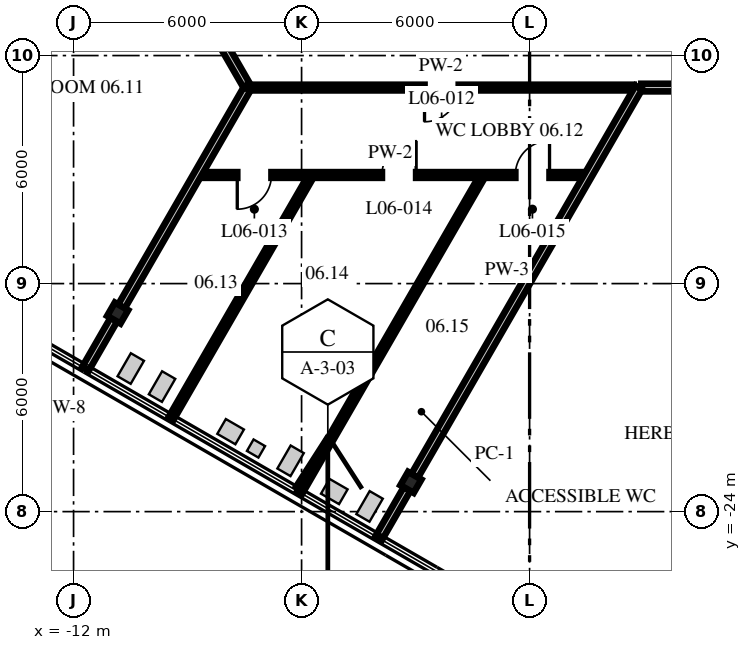
"""IFC4 building model, lengths in metres.
Left out: names, types, materials, properties, quantities, classifications, styles, units other than length and angle.
Written with IfcOpenShell. Run it as: python <this file> out.ifc"""

import sys

from ifc_helpers import new_model, si_unit, direction, frame, frame_2d, origin, origin_2d, place, context, subcontext, project, spatial, rectangle, i_section, extrude, source, transform, mapped, element, fill, save


model = new_model("IFC4")
c1 = context("Model", 3, precision=1e-05, world=origin(), true_north=direction((0.0, 1.0)))
c2 = subcontext(c1, "Body", "Model", "MODEL_VIEW")
j1 = project(units=[si_unit("LENGTHUNIT", "METRE"), si_unit("PLANEANGLEUNIT", "RADIAN")], contexts=[c1])
p1 = place(None, origin())
s1 = spatial("IfcSite", under=j1, at=p1, CompositionType="ELEMENT")
p2 = place(p1, origin())
s2 = spatial("IfcBuilding", under=s1, at=p2, CompositionType="ELEMENT")
p3 = place(p2, frame((0.0, 0.0, 28.9)))
s3 = spatial("IfcBuildingStorey", under=s2, at=p3, CompositionType="ELEMENT", Elevation=28.9)
m1 = source(origin(), c2, "Body", "SweptSolid", [
    extrude(i_section(OverallWidth=0.404, OverallDepth=0.406, WebThickness=0.027, FlangeThickness=0.044, at=origin_2d()), origin(), (0.0, 0.0, 1.0), 4.3),
])
for number, where, z_axis, x_axis in (
    (1, (-10.84, -18.775, 0.0), (0.0, 0.0, 1.0), (0.866, -0.5, 0.0)),
    (2, (-3.124, -23.23, 0.0), (0.0, 0.0, 1.0), (0.866, -0.5, 0.0)),
):
    element("IfcColumn", number, at=place(p3, frame(where, z_axis=z_axis, x_axis=x_axis)), inside=s3, PredefinedType="COLUMN", context=c2, shape_type="MappedRepresentation", body=[
        mapped(m1, transform((0.0, 0.0, 0.0), scale=1.0)),
    ])
m2 = source(origin(), c2, "Body", "SweptSolid", [
    extrude(rectangle(XDim=8.478, YDim=0.2, at=frame_2d((4.239, 0.0))), origin(), (0.0, 0.0, 1.0), 4.1),
])
p4 = place(p3, frame((-11.673, -5.466, 0.0), z_axis=(0.0, 0.0, 1.0), x_axis=(0.499985860718, -0.866033566949, 0.0)))
e3 = element("IfcWall", 3, at=p4, inside=s3, PredefinedType="PARTITIONING", context=c2, shape_type="MappedRepresentation", body=[
    mapped(m2, transform((0.0, 0.0, 0.0), scale=1.0)),
])
m3 = source(origin(), c2, "Body", "SweptSolid", [
    extrude(rectangle(XDim=10.148, YDim=0.15, at=frame_2d((5.074, 0.0))), origin(), (0.0, 0.0, 1.0), 4.1),
])
p5 = place(p3, frame((-8.742, -15.142, 0.0), z_axis=(0.0, 0.0, 1.0), x_axis=(1.0, 0.0, 0.0)))
e4 = element("IfcWall", 4, at=p5, inside=s3, PredefinedType="PARTITIONING", context=c2, shape_type="MappedRepresentation", body=[
    mapped(m3, transform((0.0, 0.0, 0.0), scale=1.0)),
])
p6 = place(p5, frame((1.05, 0.0, 0.0)))
e5 = element("IfcOpeningElement", 5, at=p6, cuts=e4, PredefinedType="OPENING", context=c2, shape_type="SweptSolid", body=[
    extrude(rectangle(XDim=0.9, YDim=2.1, at=frame_2d((0.45, 1.05))), frame((0.0, 0.085, 0.0), z_axis=(0.0, -1.0, 0.0), x_axis=(1.0, 0.0, 0.0)), (0.0, 0.0, 1.0), 0.17),
])
p7 = place(p5, frame((4.857, 0.0, 0.0)))
e6 = element("IfcOpeningElement", 6, at=p7, cuts=e4, PredefinedType="OPENING", context=c2, shape_type="SweptSolid", body=[
    extrude(rectangle(XDim=0.9, YDim=2.1, at=frame_2d((0.45, 1.05))), frame((0.0, 0.085, 0.0), z_axis=(0.0, -1.0, 0.0), x_axis=(1.0, 0.0, 0.0)), (0.0, 0.0, 1.0), 0.17),
])
p8 = place(p5, frame((8.367, 0.0, 0.0)))
e7 = element("IfcOpeningElement", 7, at=p8, cuts=e4, PredefinedType="OPENING", context=c2, shape_type="SweptSolid", body=[
    extrude(rectangle(XDim=0.9, YDim=2.1, at=frame_2d((0.45, 1.05))), frame((0.0, 0.085, 0.0), z_axis=(0.0, -1.0, 0.0), x_axis=(1.0, 0.0, 0.0)), (0.0, 0.0, 1.0), 0.17),
])
m4 = source(origin(), c2, "Body", "SweptSolid", [
    extrude(rectangle(XDim=10.155, YDim=0.15, at=frame_2d((5.078, 0.0))), origin(), (0.0, 0.0, 1.0), 4.1),
])
p9 = place(p3, frame((-7.415, -12.842, 0.0), z_axis=(0.0, 0.0, 1.0), x_axis=(1.0, 0.0, 0.0)))
e8 = element("IfcWall", 8, at=p9, inside=s3, PredefinedType="PARTITIONING", context=c2, shape_type="MappedRepresentation", body=[
    mapped(m4, transform((0.0, 0.0, 0.0), scale=1.0)),
])
p10 = place(p9, frame((4.65, 0.0, 0.0)))
e9 = element("IfcOpeningElement", 9, at=p10, cuts=e8, PredefinedType="OPENING", context=c2, shape_type="SweptSolid", body=[
    extrude(rectangle(XDim=0.9, YDim=2.1, at=frame_2d((0.45, 1.05))), frame((0.0, 0.085, 0.0), z_axis=(0.0, -1.0, 0.0), x_axis=(1.0, 0.0, 0.0)), (0.0, 0.0, 1.0), 0.17),
])
m5 = source(origin(), c2, "Body", "SweptSolid", [
    extrude(rectangle(XDim=4.404, YDim=0.2, at=frame_2d((2.202, 0.0))), origin(), (0.0, 0.0, 1.0), 4.1),
])
p11 = place(p3, frame((2.94, -12.842, 0.0), z_axis=(0.0, 0.0, 1.0), x_axis=(1.0, 0.0, 0.0)))
e10 = element("IfcWall", 10, at=p11, inside=s3, PredefinedType="PARTITIONING", context=c2, shape_type="MappedRepresentation", body=[
    mapped(m5, transform((0.0, 0.0, 0.0), scale=1.0)),
])
p12 = place(p11, frame((1.683, 0.0, 0.0)))
e11 = element("IfcOpeningElement", 11, at=p12, cuts=e10, PredefinedType="OPENING", context=c2, shape_type="SweptSolid", body=[
    extrude(rectangle(XDim=1.0, YDim=2.1, at=frame_2d((0.5, 1.05))), frame((0.0, 0.11, 0.0), z_axis=(0.0, -1.0, 0.0), x_axis=(1.0, 0.0, 0.0)), (0.0, 0.0, 1.0), 0.22),
])
m6 = source(origin(), c2, "Body", "SweptSolid", [
    extrude(rectangle(XDim=1.499, YDim=0.2, at=frame_2d((0.75, 0.0))), origin(), (0.0, 0.0, 1.0), 4.1),
])
p13 = place(p3, frame((-3.969, -24.695, 0.0), z_axis=(0.0, 0.0, 1.0), x_axis=(0.499905760005, 0.866079806435, 0.0)))
e12 = element("IfcWall", 12, at=p13, inside=s3, PredefinedType="PARTITIONING", context=c2, shape_type="MappedRepresentation", body=[
    mapped(m6, transform((0.0, 0.0, 0.0), scale=1.0)),
])
m7 = source(origin(), c2, "Body", "SweptSolid", [
    extrude(rectangle(XDim=11.802, YDim=0.2, at=frame_2d((5.901, 0.0))), origin(), (0.0, 0.0, 1.0), 3.343),
])
p14 = place(p3, frame((-3.027, -23.063, 0.0), z_axis=(0.0, 0.0, 1.0), x_axis=(0.499990468534, 0.866030906709, 0.0)))
e13 = element("IfcWall", 13, at=p14, inside=s3, PredefinedType="PARTITIONING", context=c2, shape_type="MappedRepresentation", body=[
    mapped(m7, transform((0.0, 0.0, 0.0), scale=1.0)),
])
m8 = source(origin(), c2, "Body", "SweptSolid", [
    extrude(rectangle(XDim=9.535, YDim=0.15, at=frame_2d((4.768, 0.0))), origin(), (0.0, 0.0, 1.0), 4.1),
])
p15 = place(p3, frame((-6.048, -23.495, 0.0), z_axis=(0.0, 0.0, 1.0), x_axis=(0.500005412377, 0.866022278924, 0.0)))
e14 = element("IfcWall", 14, at=p15, inside=s3, PredefinedType="PARTITIONING", context=c2, shape_type="MappedRepresentation", body=[
    mapped(m8, transform((0.0, 0.0, 0.0), scale=1.0)),
])
m9 = source(origin(), c2, "Body", "SweptSolid", [
    extrude(rectangle(XDim=7.28, YDim=0.15, at=frame_2d((3.64, 0.0))), origin(), (0.0, 0.0, 1.0), 4.1),
])
p16 = place(p3, frame((-9.43, -21.542, 0.0), z_axis=(0.0, 0.0, 1.0), x_axis=(0.499987591186, 0.866032567898, 0.0)))
e15 = element("IfcWall", 15, at=p16, inside=s3, PredefinedType="PARTITIONING", context=c2, shape_type="MappedRepresentation", body=[
    mapped(m9, transform((0.0, 0.0, 0.0), scale=1.0)),
])
m10 = source(origin(), c2, "Body", "SweptSolid", [
    extrude(rectangle(XDim=1.499, YDim=0.2, at=frame_2d((0.749, 0.0))), origin(), (0.0, 0.0, 1.0), 4.1),
])
p17 = place(p3, frame((-11.686, -20.24, 0.0), z_axis=(0.0, 0.0, 1.0), x_axis=(0.499976292358, 0.866039090965, 0.0)))
e16 = element("IfcWall", 16, at=p17, inside=s3, PredefinedType="PARTITIONING", context=c2, shape_type="MappedRepresentation", body=[
    mapped(m10, transform((0.0, 0.0, 0.0), scale=1.0)),
])
m11 = source(origin(), c2, "Body", "SweptSolid", [
    extrude(rectangle(XDim=6.617, YDim=0.2, at=frame_2d((3.309, 0.0))), origin(), (0.0, 0.0, 1.0), 3.488),
])
p18 = place(p3, frame((-10.743, -18.608, 0.0), z_axis=(0.0, 0.0, 1.0), x_axis=(0.499996046679, 0.866027686223, 0.0)))
e17 = element("IfcWall", 17, at=p18, inside=s3, PredefinedType="PARTITIONING", context=c2, shape_type="MappedRepresentation", body=[
    mapped(m11, transform((0.0, 0.0, 0.0), scale=1.0)),
])
p19 = place(p10, origin())
e18 = element("IfcDoor", 18, at=p19, inside=s3, OperationType="SINGLE_SWING_RIGHT", PredefinedType="DOOR", context=c2, shape_type="SweptSolid", body=[
    extrude(rectangle(XDim=0.9, YDim=2.1, at=frame_2d((0.45, 1.05))), frame((0.0, 0.025, 0.0), z_axis=(0.0, -1.0, 0.0), x_axis=(1.0, 0.0, 0.0)), (0.0, 0.0, 1.0), 0.05),
])
fill(e9, e18)
p20 = place(p6, origin())
e19 = element("IfcDoor", 19, at=p20, inside=s3, OperationType="SINGLE_SWING_RIGHT", PredefinedType="DOOR", context=c2, shape_type="SweptSolid", body=[
    extrude(rectangle(XDim=0.9, YDim=2.1, at=frame_2d((0.45, 1.05))), frame((0.0, 0.025, 0.0), z_axis=(0.0, -1.0, 0.0), x_axis=(1.0, 0.0, 0.0)), (0.0, 0.0, 1.0), 0.05),
])
fill(e5, e19)
p21 = place(p7, origin())
e20 = element("IfcDoor", 20, at=p21, inside=s3, OperationType="SINGLE_SWING_LEFT", PredefinedType="DOOR", context=c2, shape_type="SweptSolid", body=[
    extrude(rectangle(XDim=0.9, YDim=2.1, at=frame_2d((0.45, 1.05))), frame((0.0, 0.025, 0.0), z_axis=(0.0, -1.0, 0.0), x_axis=(1.0, 0.0, 0.0)), (0.0, 0.0, 1.0), 0.05),
])
fill(e6, e20)
p22 = place(p8, origin())
e21 = element("IfcDoor", 21, at=p22, inside=s3, OperationType="SINGLE_SWING_LEFT", PredefinedType="DOOR", context=c2, shape_type="SweptSolid", body=[
    extrude(rectangle(XDim=0.9, YDim=2.1, at=frame_2d((0.45, 1.05))), frame((0.0, 0.025, 0.0), z_axis=(0.0, -1.0, 0.0), x_axis=(1.0, 0.0, 0.0)), (0.0, 0.0, 1.0), 0.05),
])
fill(e7, e21)
save(model, sys.argv[1])
